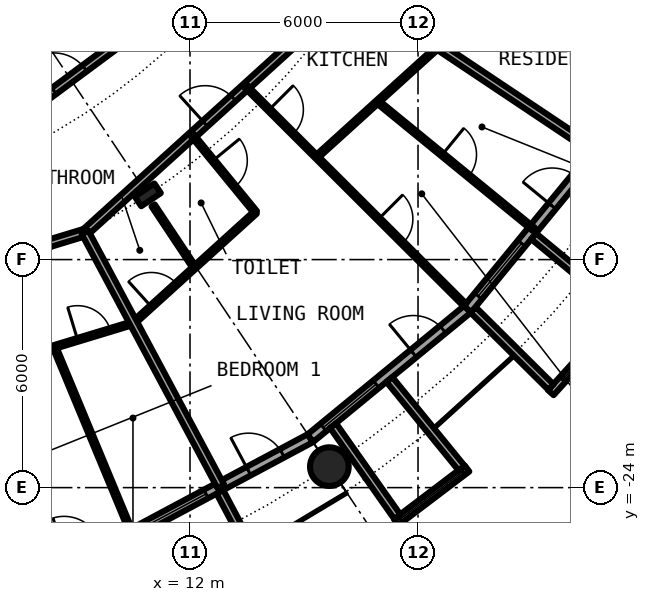
"""IFC4 building model, lengths in metres.
Left out: names, types, materials, properties, quantities, classifications, styles, units other than length and angle.
Written with IfcOpenShell. Run it as: python <this file> out.ifc"""

import sys

from ifc_helpers import new_model, si_unit, direction, frame, frame_2d, origin, origin_2d, place, context, subcontext, project, spatial, rectangle, circle, hollow_circle, i_section, extrude, element, fill, save


model = new_model("IFC4")
c1 = context("Model", 3, precision=1e-05, world=origin(), true_north=direction((0.0, 1.0)))
c2 = subcontext(c1, "Body", "Model", "MODEL_VIEW")
j1 = project(units=[si_unit("LENGTHUNIT", "METRE"), si_unit("PLANEANGLEUNIT", "RADIAN")], contexts=[c1])
p1 = place(None, origin())
s1 = spatial("IfcSite", under=j1, at=p1, CompositionType="ELEMENT")
p2 = place(p1, origin())
s2 = spatial("IfcBuilding", under=s1, at=p2, CompositionType="ELEMENT")
p3 = place(p2, frame((0.0, 0.0, 41.1)))
s3 = spatial("IfcBuildingStorey", under=s2, at=p3, CompositionType="ELEMENT", Elevation=41.1)
p4 = place(p3, frame((15.667, -23.448, 0.0), z_axis=(0.0, 0.0, 1.0), x_axis=(1.0, 0.0, 0.0)))
e1 = element("IfcColumn", 1, at=p4, inside=s3, PredefinedType="COLUMN", context=c2, shape_type="SweptSolid", body=[
    extrude(hollow_circle(Radius=0.508, WallThickness=0.05, at=origin_2d()), origin(), (0.0, 0.0, 1.0), 3.05),
])
p5 = place(p3, frame((10.889, -16.297, 0.0), z_axis=(0.0, 0.0, 1.0), x_axis=(0.55557023302, -0.831469612303, 0.0)))
e2 = element("IfcColumn", 2, at=p5, inside=s3, PredefinedType="COLUMN", context=c2, shape_type="SweptSolid", body=[
    extrude(i_section(OverallWidth=0.305, OverallDepth=0.62, WebThickness=0.021, FlangeThickness=0.04, FilletRadius=0.027, at=origin_2d()), origin(), (0.0, 0.0, 1.0), 3.05),
])
p6 = place(p3, frame((10.447, -25.222, 0.0), z_axis=(0.0, 0.0, 1.0), x_axis=(0.881915646801, 0.471407246368, 0.0)))
e3 = element("IfcWall", 3, at=p6, inside=s3, PredefinedType="SOLIDWALL", context=c2, shape_type="SweptSolid", body=[
    extrude(rectangle(XDim=5.352, YDim=0.25, at=frame_2d((2.676, 0.0))), origin(), (0.0, 0.0, 1.0), 2.7),
])
p7 = place(p6, frame((0.441, 0.0, 0.3)))
e4 = element("IfcOpeningElement", 4, at=p7, cuts=e3, PredefinedType="OPENING", context=c2, shape_type="SweptSolid", body=[
    extrude(rectangle(XDim=1.8, YDim=2.1, at=frame_2d((0.9, 1.05))), frame((0.0, 0.135, 0.0), z_axis=(0.0, -1.0, 0.0), x_axis=(1.0, 0.0, 0.0)), (0.0, 0.0, 1.0), 0.27),
])
p8 = place(p6, frame((3.51, 0.0, 0.0)))
e5 = element("IfcOpeningElement", 5, at=p8, cuts=e3, PredefinedType="OPENING", context=c2, shape_type="SweptSolid", body=[
    extrude(rectangle(XDim=1.0, YDim=2.2, at=frame_2d((0.5, 1.1))), frame((0.0, 0.135, 0.0), z_axis=(0.0, -1.0, 0.0), x_axis=(1.0, 0.0, 0.0)), (0.0, 0.0, 1.0), 0.27),
])
p9 = place(p3, frame((12.787, -24.113, -0.03), z_axis=(0.0, 0.0, 1.0), x_axis=(0.468365282436, -0.883534924159, 0.0)))
e6 = element("IfcWall", 6, at=p9, inside=s3, PredefinedType="SOLIDWALL", context=c2, shape_type="SweptSolid", body=[
    extrude(rectangle(XDim=3.006, YDim=0.2, at=frame_2d((1.503, 0.0))), origin(), (0.0, 0.0, 1.0), 2.73),
])
p10 = place(p3, frame((15.167, -22.699, 0.0), z_axis=(0.0, 0.0, 1.0), x_axis=(0.773019449054, 0.634382322723, 0.0)))
e7 = element("IfcWall", 7, at=p10, inside=s3, PredefinedType="SOLIDWALL", context=c2, shape_type="SweptSolid", body=[
    extrude(rectangle(XDim=5.352, YDim=0.25, at=frame_2d((2.676, 0.0))), origin(), (0.0, 0.0, 1.0), 2.7),
])
p11 = place(p10, frame((0.441, 0.0, 0.3)))
e8 = element("IfcOpeningElement", 8, at=p11, cuts=e7, PredefinedType="OPENING", context=c2, shape_type="SweptSolid", body=[
    extrude(rectangle(XDim=1.8, YDim=2.1, at=frame_2d((0.9, 1.05))), frame((0.0, 0.135, 0.0), z_axis=(0.0, -1.0, 0.0), x_axis=(1.0, 0.0, 0.0)), (0.0, 0.0, 1.0), 0.27),
])
p12 = place(p10, frame((3.51, 0.0, 0.0)))
e9 = element("IfcOpeningElement", 9, at=p12, cuts=e7, PredefinedType="OPENING", context=c2, shape_type="SweptSolid", body=[
    extrude(rectangle(XDim=1.0, YDim=2.2, at=frame_2d((0.5, 1.1))), frame((0.0, 0.135, 0.0), z_axis=(0.0, -1.0, 0.0), x_axis=(1.0, 0.0, 0.0)), (0.0, 0.0, 1.0), 0.27),
])
p13 = place(p3, frame((17.427, -24.909, -0.03), z_axis=(0.0, 0.0, 1.0), x_axis=(0.796842165306, 0.60418752353, 0.0)))
e10 = element("IfcWall", 10, at=p13, inside=s3, PredefinedType="SOLIDWALL", context=c2, shape_type="SweptSolid", body=[
    extrude(rectangle(XDim=2.337, YDim=0.2, at=frame_2d((1.168, 0.0))), origin(), (0.0, 0.0, 1.0), 2.73),
])
p14 = place(p13, frame((0.128, 0.0, 0.33)))
e11 = element("IfcOpeningElement", 11, at=p14, cuts=e10, PredefinedType="OPENING", context=c2, shape_type="SweptSolid", body=[
    extrude(circle(Radius=1.04, at=frame_2d((1.04, 1.04))), frame((0.0, 0.11, 0.0), z_axis=(0.0, -1.0, 0.0), x_axis=(1.0, 0.0, 0.0)), (0.0, 0.0, 1.0), 0.22),
])
p15 = place(p3, frame((15.765, -22.37, -0.03), z_axis=(0.0, 0.0, 1.0), x_axis=(0.576274612209, -0.817256123454, 0.0)))
e12 = element("IfcWall", 12, at=p15, inside=s3, PredefinedType="SOLIDWALL", context=c2, shape_type="SweptSolid", body=[
    extrude(rectangle(XDim=2.933, YDim=0.2, at=frame_2d((1.466, 0.0))), origin(), (0.0, 0.0, 1.0), 2.73),
])
p16 = place(p3, frame((17.246, -21.155, -0.03), z_axis=(0.0, 0.0, 1.0), x_axis=(0.631741648902, -0.775179004516, 0.0)))
e13 = element("IfcWall", 13, at=p16, inside=s3, PredefinedType="SOLIDWALL", context=c2, shape_type="SweptSolid", body=[
    extrude(rectangle(XDim=3.006, YDim=0.2, at=frame_2d((1.503, 0.0))), origin(), (0.0, 0.0, 1.0), 2.73),
])
p17 = place(p3, frame((19.304, -19.304, 0.0), z_axis=(0.0, 0.0, 1.0), x_axis=(0.634382322723, 0.773019449054, 0.0)))
e14 = element("IfcWall", 14, at=p17, inside=s3, PredefinedType="SOLIDWALL", context=c2, shape_type="SweptSolid", body=[
    extrude(rectangle(XDim=5.352, YDim=0.25, at=frame_2d((2.676, 0.0))), origin(), (0.0, 0.0, 1.0), 2.7),
])
p18 = place(p17, frame((0.441, 0.0, 0.3)))
e15 = element("IfcOpeningElement", 15, at=p18, cuts=e14, PredefinedType="OPENING", context=c2, shape_type="SweptSolid", body=[
    extrude(rectangle(XDim=1.8, YDim=2.1, at=frame_2d((0.9, 1.05))), frame((0.0, 0.135, 0.0), z_axis=(0.0, -1.0, 0.0), x_axis=(1.0, 0.0, 0.0)), (0.0, 0.0, 1.0), 0.27),
])
p19 = place(p17, frame((3.51, 0.0, 0.0)))
e16 = element("IfcOpeningElement", 16, at=p19, cuts=e14, PredefinedType="OPENING", context=c2, shape_type="SweptSolid", body=[
    extrude(rectangle(XDim=1.0, YDim=2.2, at=frame_2d((0.5, 1.1))), frame((0.0, 0.135, 0.0), z_axis=(0.0, -1.0, 0.0), x_axis=(1.0, 0.0, 0.0)), (0.0, 0.0, 1.0), 0.27),
])
p20 = place(p3, frame((21.493, -21.5, -0.03), z_axis=(0.0, 0.0, 1.0), x_axis=(0.671506829416, 0.740998365753, 0.0)))
e17 = element("IfcWall", 17, at=p20, inside=s3, PredefinedType="SOLIDWALL", context=c2, shape_type="SweptSolid", body=[
    extrude(rectangle(XDim=2.993, YDim=0.2, at=frame_2d((1.497, 0.0))), origin(), (0.0, 0.0, 1.0), 2.73),
])
p21 = place(p20, frame((0.457, 0.0, 0.33)))
e18 = element("IfcOpeningElement", 18, at=p21, cuts=e17, PredefinedType="OPENING", context=c2, shape_type="SweptSolid", body=[
    extrude(circle(Radius=1.04, at=frame_2d((1.04, 1.04))), frame((0.0, 0.11, 0.0), z_axis=(0.0, -1.0, 0.0), x_axis=(1.0, 0.0, 0.0)), (0.0, 0.0, 1.0), 0.22),
])
p22 = place(p3, frame((19.45, -19.323, -0.03), z_axis=(0.0, 0.0, 1.0), x_axis=(0.709727076896, -0.704476739375, 0.0)))
e19 = element("IfcWall", 19, at=p22, inside=s3, PredefinedType="SOLIDWALL", context=c2, shape_type="SweptSolid", body=[
    extrude(rectangle(XDim=2.883, YDim=0.2, at=frame_2d((1.441, 0.0))), origin(), (0.0, 0.0, 1.0), 2.73),
])
p23 = place(p3, frame((21.041, -17.384, -0.03), z_axis=(0.0, 0.0, 1.0), x_axis=(0.770784861449, -0.63709551667, 0.0)))
e20 = element("IfcWall", 20, at=p23, inside=s3, PredefinedType="SOLIDWALL", context=c2, shape_type="SweptSolid", body=[
    extrude(rectangle(XDim=3.006, YDim=0.2, at=frame_2d((1.503, 0.0))), origin(), (0.0, 0.0, 1.0), 2.73),
])
p24 = place(p3, frame((6.346, -20.931, 0.0), z_axis=(0.0, 0.0, 1.0), x_axis=(0.956923957423, 0.290338663821, 0.0)))
e21 = element("IfcWall", 21, at=p24, inside=s3, PredefinedType="PARTITIONING", context=c2, shape_type="SweptSolid", body=[
    extrude(rectangle(XDim=4.357, YDim=0.1, at=frame_2d((2.178, 0.0))), origin(), (0.0, 0.0, 1.0), 2.7),
])
p25 = place(p24, frame((2.818, 0.0, 0.0)))
e22 = element("IfcOpeningElement", 22, at=p25, cuts=e21, PredefinedType="OPENING", context=c2, shape_type="SweptSolid", body=[
    extrude(rectangle(XDim=0.9, YDim=2.3, at=frame_2d((0.45, 1.15))), frame((0.0, 0.06, 0.0), z_axis=(0.0, -1.0, 0.0), x_axis=(1.0, 0.0, 0.0)), (0.0, 0.0, 1.0), 0.12),
])
p26 = place(p3, frame((10.506, -19.671, 0.0), z_axis=(0.0, 0.0, 1.0), x_axis=(0.741162670015, 0.671325477377, 0.0)))
e23 = element("IfcWall", 23, at=p26, inside=s3, PredefinedType="PARTITIONING", context=c2, shape_type="SweptSolid", body=[
    extrude(rectangle(XDim=4.342, YDim=0.1, at=frame_2d((2.171, 0.0))), origin(), (0.0, 0.0, 1.0), 2.7),
])
p27 = place(p26, frame((0.643, 0.0, 0.0)))
e24 = element("IfcOpeningElement", 24, at=p27, cuts=e23, PredefinedType="OPENING", context=c2, shape_type="SweptSolid", body=[
    extrude(rectangle(XDim=0.9, YDim=2.3, at=frame_2d((0.45, 1.15))), frame((0.0, 0.06, 0.0), z_axis=(0.0, -1.0, 0.0), x_axis=(1.0, 0.0, 0.0)), (0.0, 0.0, 1.0), 0.12),
])
p28 = place(p3, frame((15.33, -15.301, 0.0), z_axis=(0.0, 0.0, 1.0), x_axis=(0.741109646243, 0.671384012504, 0.0)))
e25 = element("IfcWall", 25, at=p28, inside=s3, PredefinedType="PARTITIONING", context=c2, shape_type="SweptSolid", body=[
    extrude(rectangle(XDim=4.331, YDim=0.1, at=frame_2d((2.166, 0.0))), origin(), (0.0, 0.0, 1.0), 2.7),
])
p29 = place(p3, frame((3.915, -18.901, 0.0), z_axis=(0.0, 0.0, 1.0), x_axis=(0.956941324682, 0.290281417103, 0.0)))
e26 = element("IfcWall", 26, at=p29, inside=s3, PredefinedType="PARTITIONING", context=c2, shape_type="SweptSolid", body=[
    extrude(rectangle(XDim=5.563, YDim=0.2, at=frame_2d((2.782, 0.0))), origin(), (0.0, 0.0, 1.0), 2.38),
])
p30 = place(p29, frame((2.196, 0.0, 0.0)))
e27 = element("IfcOpeningElement", 27, at=p30, cuts=e26, PredefinedType="OPENING", context=c2, shape_type="SweptSolid", body=[
    extrude(rectangle(XDim=1.0, YDim=2.3, at=frame_2d((0.5, 1.15))), frame((0.0, 0.11, 0.0), z_axis=(0.0, -1.0, 0.0), x_axis=(1.0, 0.0, 0.0)), (0.0, 0.0, 1.0), 0.22),
])
p31 = place(p3, frame((9.239, -17.287, 0.0), z_axis=(0.0, 0.0, 1.0), x_axis=(0.74089212117, 0.671624050186, 0.0)))
e28 = element("IfcWall", 28, at=p31, inside=s3, PredefinedType="PARTITIONING", context=c2, shape_type="SweptSolid", body=[
    extrude(rectangle(XDim=9.368, YDim=0.2, at=frame_2d((4.684, 0.0))), origin(), (0.0, 0.0, 1.0), 2.38),
])
p32 = place(p31, frame((4.263, 0.0, 0.0)))
e29 = element("IfcOpeningElement", 29, at=p32, cuts=e28, PredefinedType="OPENING", context=c2, shape_type="SweptSolid", body=[
    extrude(rectangle(XDim=1.0, YDim=2.3, at=frame_2d((0.5, 1.15))), frame((0.0, 0.11, 0.0), z_axis=(0.0, -1.0, 0.0), x_axis=(1.0, 0.0, 0.0)), (0.0, 0.0, 1.0), 0.22),
])
p33 = place(p3, frame((4.906, -16.172, 0.0), z_axis=(0.0, 0.0, 1.0), x_axis=(0.803202106898, 0.595706618626, 0.0)))
e30 = element("IfcWall", 30, at=p33, inside=s3, PredefinedType="PARTITIONING", context=c2, shape_type="SweptSolid", body=[
    extrude(rectangle(XDim=11.368, YDim=0.2, at=frame_2d((5.684, 0.0))), origin(), (0.0, 0.0, 1.0), 2.7),
])
p34 = place(p33, frame((4.38, 0.0, 0.0)))
e31 = element("IfcOpeningElement", 31, at=p34, cuts=e30, PredefinedType="OPENING", context=c2, shape_type="SweptSolid", body=[
    extrude(rectangle(XDim=1.0, YDim=2.3, at=frame_2d((0.5, 1.15))), frame((0.0, 0.11, 0.0), z_axis=(0.0, -1.0, 0.0), x_axis=(1.0, 0.0, 0.0)), (0.0, 0.0, 1.0), 0.22),
])
p35 = place(p3, frame((8.431, -20.298, 0.0), z_axis=(0.0, 0.0, 1.0), x_axis=(0.383640855682, -0.92348237333, 0.0)))
e32 = element("IfcWall", 32, at=p35, inside=s3, PredefinedType="PARTITIONING", context=c2, shape_type="SweptSolid", body=[
    extrude(rectangle(XDim=5.195, YDim=0.1, at=frame_2d((2.598, 0.0))), origin(), (0.0, 0.0, 1.0), 2.7),
])
p36 = place(p3, frame((9.239, -17.286, 0.0), z_axis=(0.0, 0.0, 1.0), x_axis=(0.471439510802, -0.881898399848, 0.0)))
e33 = element("IfcWall", 33, at=p36, inside=s3, PredefinedType="PARTITIONING", context=c2, shape_type="SweptSolid", body=[
    extrude(rectangle(XDim=7.575, YDim=0.2, at=frame_2d((3.787, 0.0))), origin(), (0.0, 0.0, 1.0), 2.7),
])
p37 = place(p3, frame((11.03, -16.576, 0.0), z_axis=(0.0, 0.0, 1.0), x_axis=(0.553954074672, -0.83254722578, 0.0)))
e34 = element("IfcWall", 34, at=p37, inside=s3, PredefinedType="PARTITIONING", context=c2, shape_type="SweptSolid", body=[
    extrude(rectangle(XDim=1.964, YDim=0.1, at=frame_2d((0.982, 0.0))), origin(), (0.0, 0.0, 1.0), 2.7),
])
p38 = place(p3, frame((12.062, -14.727, 0.0), z_axis=(0.0, 0.0, 1.0), x_axis=(0.633688798249, -0.773588073185, 0.0)))
e35 = element("IfcWall", 35, at=p38, inside=s3, PredefinedType="PARTITIONING", context=c2, shape_type="SweptSolid", body=[
    extrude(rectangle(XDim=2.623, YDim=0.1, at=frame_2d((1.312, 0.0))), origin(), (0.0, 0.0, 1.0), 2.7),
])
p39 = place(p38, frame((0.861, 0.0, 0.0)))
e36 = element("IfcOpeningElement", 36, at=p39, cuts=e35, PredefinedType="OPENING", context=c2, shape_type="SweptSolid", body=[
    extrude(rectangle(XDim=0.9, YDim=2.3, at=frame_2d((0.45, 1.15))), frame((0.0, 0.06, 0.0), z_axis=(0.0, -1.0, 0.0), x_axis=(1.0, 0.0, 0.0)), (0.0, 0.0, 1.0), 0.12),
])
p40 = place(p3, frame((13.474, -13.448, 0.0), z_axis=(0.0, 0.0, 1.0), x_axis=(0.707901324545, -0.706311344031, 0.0)))
e37 = element("IfcWall", 37, at=p40, inside=s3, PredefinedType="PARTITIONING", context=c2, shape_type="SweptSolid", body=[
    extrude(rectangle(XDim=8.138, YDim=0.1, at=frame_2d((4.069, 0.0))), origin(), (0.0, 0.0, 1.0), 2.7),
])
p41 = place(p40, frame((0.861, 0.0, 0.0)))
e38 = element("IfcOpeningElement", 38, at=p41, cuts=e37, PredefinedType="OPENING", context=c2, shape_type="SweptSolid", body=[
    extrude(rectangle(XDim=0.9, YDim=2.3, at=frame_2d((0.45, 1.15))), frame((0.0, 0.06, 0.0), z_axis=(0.0, -1.0, 0.0), x_axis=(1.0, 0.0, 0.0)), (0.0, 0.0, 1.0), 0.12),
])
p42 = place(p40, frame((4.931, 0.0, 0.0)))
e39 = element("IfcOpeningElement", 39, at=p42, cuts=e37, PredefinedType="OPENING", context=c2, shape_type="SweptSolid", body=[
    extrude(rectangle(XDim=0.9, YDim=2.3, at=frame_2d((0.45, 1.15))), frame((0.0, 0.06, 0.0), z_axis=(0.0, -1.0, 0.0), x_axis=(1.0, 0.0, 0.0)), (0.0, 0.0, 1.0), 0.12),
])
p43 = place(p3, frame((16.555, -11.061, 0.0), z_axis=(0.0, 0.0, 1.0), x_axis=(0.831507055747, -0.555514190857, 0.0)))
e40 = element("IfcWall", 40, at=p43, inside=s3, PredefinedType="PARTITIONING", context=c2, shape_type="SweptSolid", body=[
    extrude(rectangle(XDim=7.265, YDim=0.2, at=frame_2d((3.633, 0.0))), origin(), (0.0, 0.0, 1.0), 2.7),
])
p44 = place(p3, frame((16.936, -13.845, 0.0), z_axis=(0.0, 0.0, 1.0), x_axis=(0.774310172558, -0.632806255241, 0.0)))
e41 = element("IfcWall", 41, at=p44, inside=s3, PredefinedType="PARTITIONING", context=c2, shape_type="SweptSolid", body=[
    extrude(rectangle(XDim=5.3, YDim=0.1, at=frame_2d((2.65, 0.0))), origin(), (0.0, 0.0, 1.0), 2.7),
])
p45 = place(p44, frame((2.2, 0.0, 0.0)))
e42 = element("IfcOpeningElement", 42, at=p45, cuts=e41, PredefinedType="OPENING", context=c2, shape_type="SweptSolid", body=[
    extrude(rectangle(XDim=0.9, YDim=2.3, at=frame_2d((0.45, 1.15))), frame((0.0, 0.06, 0.0), z_axis=(0.0, -1.0, 0.0), x_axis=(1.0, 0.0, 0.0)), (0.0, 0.0, 1.0), 0.12),
])
p46 = place(p7, origin())
e43 = element("IfcWindow", 43, at=p46, inside=s3, PartitioningType="SINGLE_PANEL", PredefinedType="WINDOW", context=c2, shape_type="SweptSolid", body=[
    extrude(rectangle(XDim=1.8, YDim=2.1, at=frame_2d((0.9, 1.05))), frame((0.0, 0.03, 0.0), z_axis=(0.0, -1.0, 0.0), x_axis=(1.0, 0.0, 0.0)), (0.0, 0.0, 1.0), 0.06),
])
fill(e4, e43)
p47 = place(p8, origin())
e44 = element("IfcDoor", 44, at=p47, inside=s3, OperationType="SINGLE_SWING_LEFT", PredefinedType="DOOR", context=c2, shape_type="SweptSolid", body=[
    extrude(rectangle(XDim=1.0, YDim=2.2, at=frame_2d((0.5, 1.1))), frame((0.0, 0.025, 0.0), z_axis=(0.0, -1.0, 0.0), x_axis=(1.0, 0.0, 0.0)), (0.0, 0.0, 1.0), 0.05),
])
fill(e5, e44)
p48 = place(p11, origin())
e45 = element("IfcWindow", 45, at=p48, inside=s3, PartitioningType="SINGLE_PANEL", PredefinedType="WINDOW", context=c2, shape_type="SweptSolid", body=[
    extrude(rectangle(XDim=1.8, YDim=2.1, at=frame_2d((0.9, 1.05))), frame((0.0, 0.03, 0.0), z_axis=(0.0, -1.0, 0.0), x_axis=(1.0, 0.0, 0.0)), (0.0, 0.0, 1.0), 0.06),
])
fill(e8, e45)
p49 = place(p14, origin())
e46 = element("IfcWindow", 46, at=p49, inside=s3, PartitioningType="SINGLE_PANEL", PredefinedType="WINDOW", context=c2, shape_type="SweptSolid", body=[
    extrude(circle(Radius=1.04, at=frame_2d((1.04, 1.04))), frame((0.0, 0.03, 0.0), z_axis=(0.0, -1.0, 0.0), x_axis=(1.0, 0.0, 0.0)), (0.0, 0.0, 1.0), 0.06),
])
fill(e11, e46)
p50 = place(p12, origin())
e47 = element("IfcDoor", 47, at=p50, inside=s3, OperationType="SINGLE_SWING_LEFT", PredefinedType="DOOR", context=c2, shape_type="SweptSolid", body=[
    extrude(rectangle(XDim=1.0, YDim=2.2, at=frame_2d((0.5, 1.1))), frame((0.0, 0.025, 0.0), z_axis=(0.0, -1.0, 0.0), x_axis=(1.0, 0.0, 0.0)), (0.0, 0.0, 1.0), 0.05),
])
fill(e9, e47)
p51 = place(p18, origin())
e48 = element("IfcWindow", 48, at=p51, inside=s3, PartitioningType="SINGLE_PANEL", PredefinedType="WINDOW", context=c2, shape_type="SweptSolid", body=[
    extrude(rectangle(XDim=1.8, YDim=2.1, at=frame_2d((0.9, 1.05))), frame((0.0, 0.03, 0.0), z_axis=(0.0, -1.0, 0.0), x_axis=(1.0, 0.0, 0.0)), (0.0, 0.0, 1.0), 0.06),
])
fill(e15, e48)
p52 = place(p21, origin())
e49 = element("IfcWindow", 49, at=p52, inside=s3, PartitioningType="SINGLE_PANEL", PredefinedType="WINDOW", context=c2, shape_type="SweptSolid", body=[
    extrude(circle(Radius=1.04, at=frame_2d((1.04, 1.04))), frame((0.0, 0.03, 0.0), z_axis=(0.0, -1.0, 0.0), x_axis=(1.0, 0.0, 0.0)), (0.0, 0.0, 1.0), 0.06),
])
fill(e18, e49)
p53 = place(p19, origin())
e50 = element("IfcDoor", 50, at=p53, inside=s3, OperationType="SINGLE_SWING_LEFT", PredefinedType="DOOR", context=c2, shape_type="SweptSolid", body=[
    extrude(rectangle(XDim=1.0, YDim=2.2, at=frame_2d((0.5, 1.1))), frame((0.0, 0.025, 0.0), z_axis=(0.0, -1.0, 0.0), x_axis=(1.0, 0.0, 0.0)), (0.0, 0.0, 1.0), 0.05),
])
fill(e16, e50)
p54 = place(p25, origin())
e51 = element("IfcDoor", 51, at=p54, inside=s3, OperationType="SINGLE_SWING_RIGHT", PredefinedType="DOOR", context=c2, shape_type="SweptSolid", body=[
    extrude(rectangle(XDim=0.9, YDim=2.3, at=frame_2d((0.45, 1.15))), frame((0.0, 0.025, 0.0), z_axis=(0.0, -1.0, 0.0), x_axis=(1.0, 0.0, 0.0)), (0.0, 0.0, 1.0), 0.05),
])
fill(e22, e51)
p55 = place(p32, origin())
e52 = element("IfcDoor", 52, at=p55, inside=s3, OperationType="SINGLE_SWING_RIGHT", PredefinedType="DOOR", context=c2, shape_type="SweptSolid", body=[
    extrude(rectangle(XDim=1.0, YDim=2.3, at=frame_2d((0.5, 1.15))), frame((0.0, 0.025, 0.0), z_axis=(0.0, -1.0, 0.0), x_axis=(1.0, 0.0, 0.0)), (0.0, 0.0, 1.0), 0.05),
])
fill(e29, e52)
p56 = place(p27, origin())
e53 = element("IfcDoor", 53, at=p56, inside=s3, OperationType="SINGLE_SWING_LEFT", PredefinedType="DOOR", context=c2, shape_type="SweptSolid", body=[
    extrude(rectangle(XDim=0.9, YDim=2.3, at=frame_2d((0.45, 1.15))), frame((0.0, 0.025, 0.0), z_axis=(0.0, -1.0, 0.0), x_axis=(1.0, 0.0, 0.0)), (0.0, 0.0, 1.0), 0.05),
])
fill(e24, e53)
p57 = place(p39, origin())
e54 = element("IfcDoor", 54, at=p57, inside=s3, OperationType="SINGLE_SWING_LEFT", PredefinedType="DOOR", context=c2, shape_type="SweptSolid", body=[
    extrude(rectangle(XDim=0.9, YDim=2.3, at=frame_2d((0.45, 1.15))), frame((0.0, 0.025, 0.0), z_axis=(0.0, -1.0, 0.0), x_axis=(1.0, 0.0, 0.0)), (0.0, 0.0, 1.0), 0.05),
])
fill(e36, e54)
p58 = place(p41, origin())
e55 = element("IfcDoor", 55, at=p58, inside=s3, OperationType="SINGLE_SWING_LEFT", PredefinedType="DOOR", context=c2, shape_type="SweptSolid", body=[
    extrude(rectangle(XDim=0.9, YDim=2.3, at=frame_2d((0.45, 1.15))), frame((0.0, 0.025, 0.0), z_axis=(0.0, -1.0, 0.0), x_axis=(1.0, 0.0, 0.0)), (0.0, 0.0, 1.0), 0.05),
])
fill(e38, e55)
p59 = place(p42, origin())
e56 = element("IfcDoor", 56, at=p59, inside=s3, OperationType="SINGLE_SWING_RIGHT", PredefinedType="DOOR", context=c2, shape_type="SweptSolid", body=[
    extrude(rectangle(XDim=0.9, YDim=2.3, at=frame_2d((0.45, 1.15))), frame((0.0, 0.025, 0.0), z_axis=(0.0, -1.0, 0.0), x_axis=(1.0, 0.0, 0.0)), (0.0, 0.0, 1.0), 0.05),
])
fill(e39, e56)
p60 = place(p45, origin())
e57 = element("IfcDoor", 57, at=p60, inside=s3, OperationType="SINGLE_SWING_LEFT", PredefinedType="DOOR", context=c2, shape_type="SweptSolid", body=[
    extrude(rectangle(XDim=0.9, YDim=2.3, at=frame_2d((0.45, 1.15))), frame((0.0, 0.025, 0.0), z_axis=(0.0, -1.0, 0.0), x_axis=(1.0, 0.0, 0.0)), (0.0, 0.0, 1.0), 0.05),
])
fill(e42, e57)
p61 = place(p34, origin())
e58 = element("IfcDoor", 58, at=p61, inside=s3, OperationType="SINGLE_SWING_LEFT", PredefinedType="DOOR", context=c2, shape_type="SweptSolid", body=[
    extrude(rectangle(XDim=1.0, YDim=2.3, at=frame_2d((0.5, 1.15))), frame((0.0, 0.025, 0.0), z_axis=(0.0, -1.0, 0.0), x_axis=(1.0, 0.0, 0.0)), (0.0, 0.0, 1.0), 0.05),
])
fill(e31, e58)
save(model, sys.argv[1])
